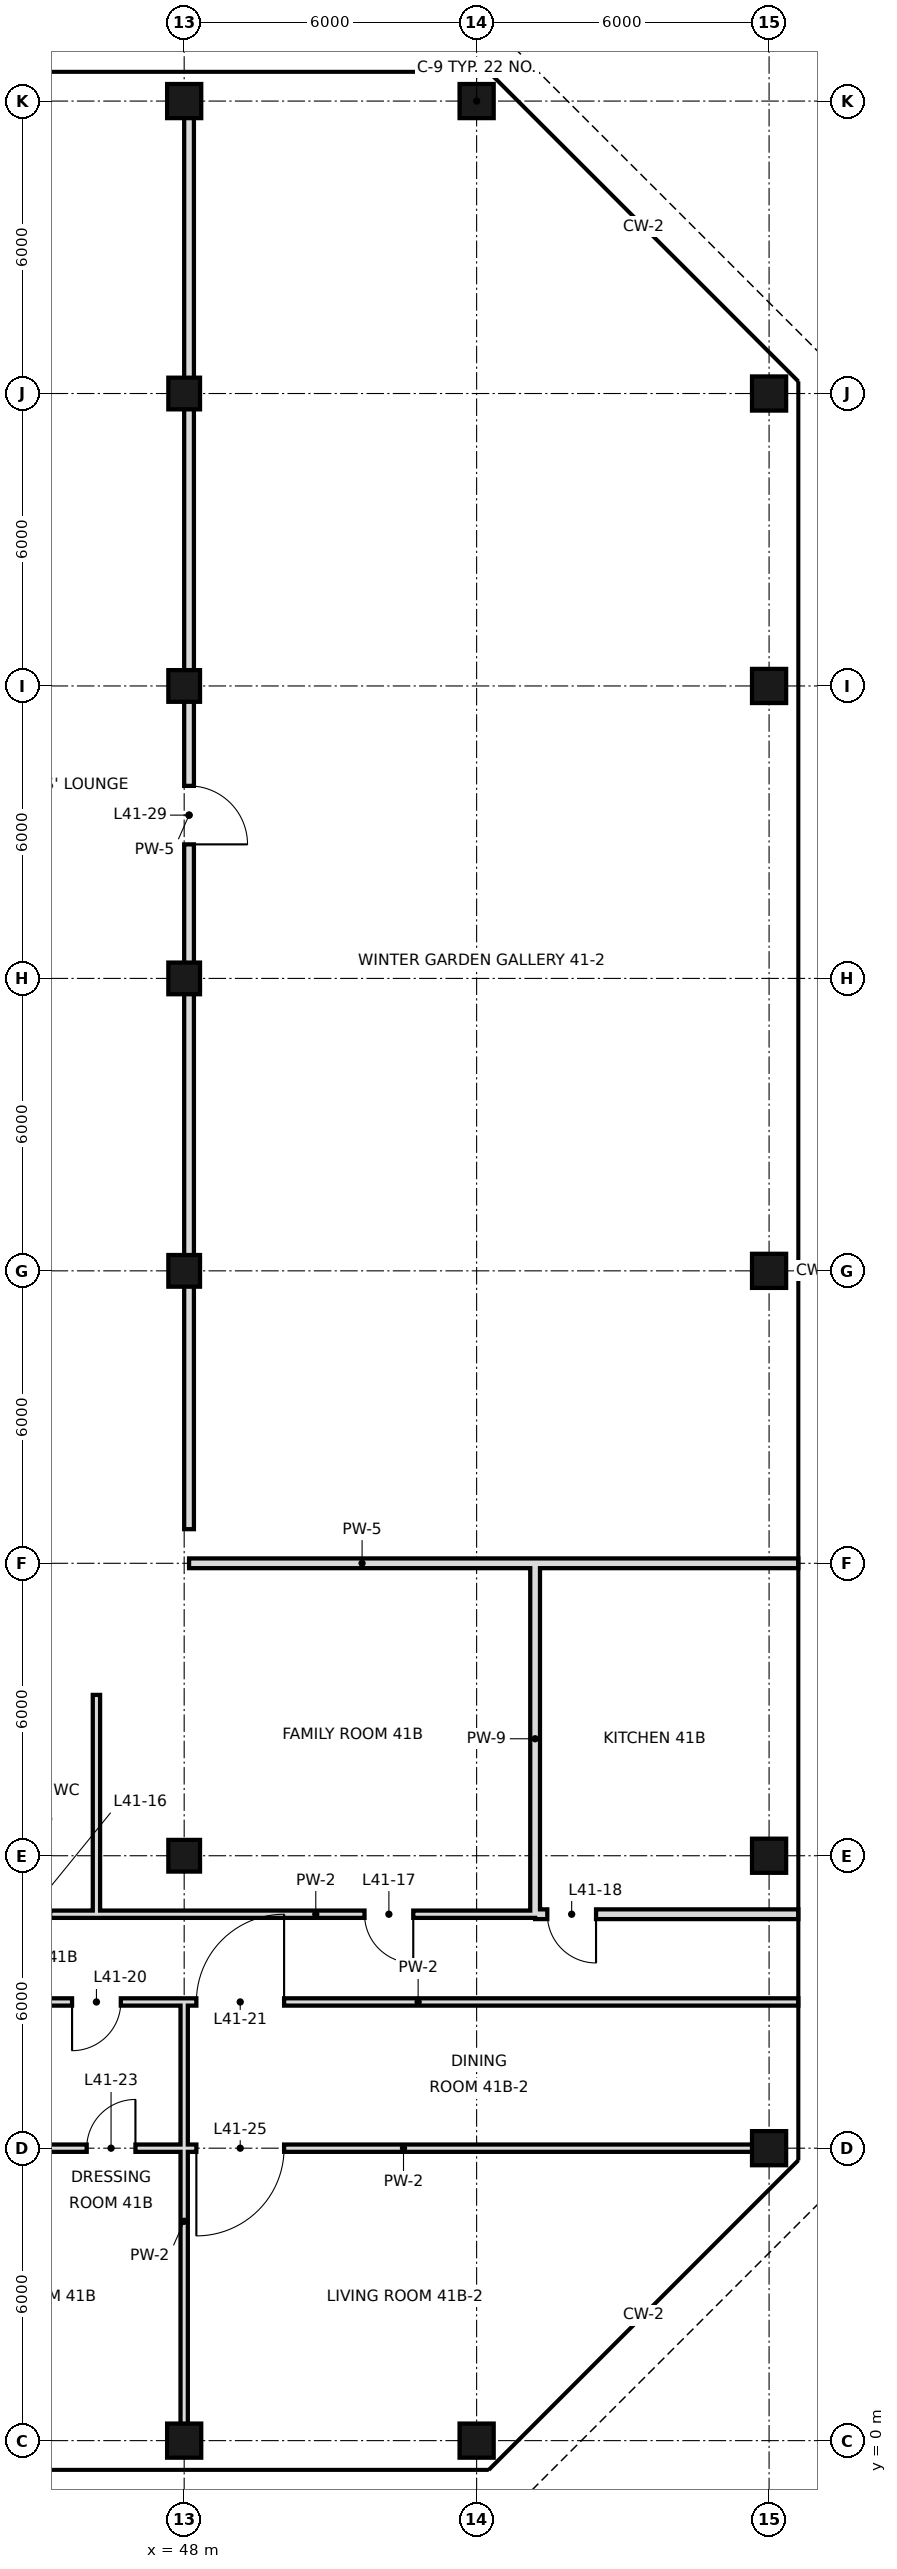
"""IFC4 building model, lengths in metres.
Left out: names, types, materials, properties, quantities, classifications, styles, units other than length and angle.
Written with IfcOpenShell. Run it as: python <this file> out.ifc"""

import sys

from ifc_helpers import new_model, si_unit, direction, frame, frame_2d, origin, origin_2d, place, context, subcontext, project, spatial, rectangle, hollow_rectangle, extrude, element, fill, save


model = new_model("IFC4")
c1 = context("Model", 3, precision=1e-05, world=origin(), true_north=direction((0.0, 1.0)))
c2 = subcontext(c1, "Body", "Model", "MODEL_VIEW")
j1 = project(units=[si_unit("LENGTHUNIT", "METRE"), si_unit("PLANEANGLEUNIT", "RADIAN")], contexts=[c1])
p1 = place(None, origin())
s1 = spatial("IfcSite", under=j1, at=p1, CompositionType="ELEMENT")
p2 = place(p1, origin())
s2 = spatial("IfcBuilding", under=s1, at=p2, CompositionType="ELEMENT")
p3 = place(p2, frame((0.0, 0.0, 178.0)))
s3 = spatial("IfcBuildingStorey", under=s2, at=p3, CompositionType="ELEMENT", Elevation=178.0)
p4 = place(p3, frame((48.0, 0.0, 0.0), z_axis=(0.0, 0.0, 1.0), x_axis=(1.0, 0.0, 0.0)))
e1 = element("IfcColumn", 1, at=p4, inside=s3, PredefinedType="COLUMN", context=c2, shape_type="SweptSolid", body=[
    extrude(hollow_rectangle(XDim=0.7, YDim=0.7, WallThickness=0.036, at=origin_2d()), origin(), (0.0, 0.0, 1.0), 3.6),
])
for number, where, z_axis, x_axis in (
    (2, (48.0, 12.0, 0.0), (0.0, 0.0, 1.0), (1.0, 0.0, 0.0)),
    (3, (48.0, 24.0, 0.0), (0.0, 0.0, 1.0), (1.0, 0.0, 0.0)),
    (4, (48.0, 30.0, 0.0), (0.0, 0.0, 1.0), (1.0, 0.0, 0.0)),
    (5, (48.0, 36.0, 0.0), (0.0, 0.0, 1.0), (1.0, 0.0, 0.0)),
    (6, (48.0, 42.0, 0.0), (0.0, 0.0, 1.0), (1.0, 0.0, 0.0)),
):
    element("IfcColumn", number, at=place(p3, frame(where, z_axis=z_axis, x_axis=x_axis)), inside=s3, PredefinedType="COLUMN", context=c2, shape_type="SweptSolid", body=[
        extrude(hollow_rectangle(XDim=0.65, YDim=0.65, WallThickness=0.032, at=origin_2d()), origin(), (0.0, 0.0, 1.0), 3.6),
    ])
for number, where, z_axis, x_axis in (
    (7, (48.0, 48.0, 0.0), (0.0, 0.0, 1.0), (1.0, 0.0, 0.0)),
    (8, (54.0, 0.0, 0.0), (0.0, 0.0, 1.0), (1.0, 0.0, 0.0)),
    (9, (54.0, 48.0, 0.0), (0.0, 0.0, 1.0), (1.0, 0.0, 0.0)),
    (10, (60.0, 6.0, 0.0), (0.0, 0.0, 1.0), (1.0, 0.0, 0.0)),
    (11, (60.0, 12.0, 0.0), (0.0, 0.0, 1.0), (1.0, 0.0, 0.0)),
    (12, (60.0, 24.0, 0.0), (0.0, 0.0, 1.0), (1.0, 0.0, 0.0)),
    (13, (60.0, 36.0, 0.0), (0.0, 0.0, 1.0), (1.0, 0.0, 0.0)),
    (14, (60.0, 42.0, 0.0), (0.0, 0.0, 1.0), (1.0, 0.0, 0.0)),
):
    element("IfcColumn", number, at=place(p3, frame(where, z_axis=z_axis, x_axis=x_axis)), inside=s3, PredefinedType="COLUMN", context=c2, shape_type="SweptSolid", body=[
        extrude(hollow_rectangle(XDim=0.7, YDim=0.7, WallThickness=0.036, at=origin_2d()), origin(), (0.0, 0.0, 1.0), 3.6),
    ])
p5 = place(p3, frame((46.2, 10.8, 0.0), z_axis=(0.0, 0.0, 1.0), x_axis=(0.0, 1.0, 0.0)))
e15 = element("IfcWall", 15, at=p5, inside=s3, PredefinedType="PARTITIONING", context=c2, shape_type="SweptSolid", body=[
    extrude(rectangle(XDim=4.5, YDim=0.15, at=frame_2d((2.25, 0.0))), origin(), (0.0, 0.0, 1.0), 3.42),
])
p6 = place(p3, frame((48.0, 0.0, 0.0), z_axis=(0.0, 0.0, 1.0), x_axis=(0.0, 1.0, 0.0)))
e16 = element("IfcWall", 16, at=p6, inside=s3, PredefinedType="PARTITIONING", context=c2, shape_type="SweptSolid", body=[
    extrude(rectangle(XDim=9.0, YDim=0.15, at=frame_2d((4.5, 0.0))), origin(), (0.0, 0.0, 1.0), 2.72),
])
p7 = place(p3, frame((48.1, 18.7, 0.0), z_axis=(0.0, 0.0, 1.0), x_axis=(0.0, 1.0, 0.0)))
e17 = element("IfcWall", 17, at=p7, inside=s3, PredefinedType="SOLIDWALL", context=c2, shape_type="SweptSolid", body=[
    extrude(rectangle(XDim=29.3, YDim=0.2, at=frame_2d((14.65, 0.0))), origin(), (0.0, 0.0, 1.0), 2.72),
])
p8 = place(p7, frame((14.05, 0.0, 0.0)))
e18 = element("IfcOpeningElement", 18, at=p8, cuts=e17, PredefinedType="OPENING", context=c2, shape_type="SweptSolid", body=[
    extrude(rectangle(XDim=1.2, YDim=2.4, at=frame_2d((0.6, 1.2))), frame((0.0, 0.11, 0.0), z_axis=(0.0, -1.0, 0.0), x_axis=(1.0, 0.0, 0.0)), (0.0, 0.0, 1.0), 0.22),
])
p9 = place(p3, frame((55.2, 10.8, 0.0), z_axis=(0.0, 0.0, 1.0), x_axis=(0.0, 1.0, 0.0)))
e19 = element("IfcWall", 19, at=p9, inside=s3, PredefinedType="SOLIDWALL", context=c2, shape_type="SweptSolid", body=[
    extrude(rectangle(XDim=7.2, YDim=0.2, at=frame_2d((3.6, 0.0))), origin(), (0.0, 0.0, 1.0), 2.72),
])
p10 = place(p3, frame((55.2, 10.8, 0.0), z_axis=(0.0, 0.0, 1.0), x_axis=(1.0, 0.0, 0.0)))
e20 = element("IfcWall", 20, at=p10, inside=s3, PredefinedType="SOLIDWALL", context=c2, shape_type="SweptSolid", body=[
    extrude(rectangle(XDim=5.4, YDim=0.2, at=frame_2d((2.7, 0.0))), origin(), (0.0, 0.0, 1.0), 2.97),
])
p11 = place(p10, frame((0.25, 0.0, 0.0)))
e21 = element("IfcOpeningElement", 21, at=p11, cuts=e20, PredefinedType="OPENING", context=c2, shape_type="SweptSolid", body=[
    extrude(rectangle(XDim=1.0, YDim=2.4, at=frame_2d((0.5, 1.2))), frame((0.0, 0.11, 0.0), z_axis=(0.0, -1.0, 0.0), x_axis=(1.0, 0.0, 0.0)), (0.0, 0.0, 1.0), 0.22),
])
p12 = place(p3, frame((46.2, 10.8, 0.0), z_axis=(0.0, 0.0, 1.0), x_axis=(1.0, 0.0, 0.0)))
e22 = element("IfcWall", 22, at=p12, inside=s3, PredefinedType="PARTITIONING", context=c2, shape_type="SweptSolid", body=[
    extrude(rectangle(XDim=9.0, YDim=0.15, at=frame_2d((4.5, 0.0))), origin(), (0.0, 0.0, 1.0), 3.42),
])
p13 = place(p12, frame((5.5, 0.0, 0.0)))
e23 = element("IfcOpeningElement", 23, at=p13, cuts=e22, PredefinedType="OPENING", context=c2, shape_type="SweptSolid", body=[
    extrude(rectangle(XDim=1.0, YDim=2.4, at=frame_2d((0.5, 1.2))), frame((0.0, 0.085, 0.0), z_axis=(0.0, -1.0, 0.0), x_axis=(1.0, 0.0, 0.0)), (0.0, 0.0, 1.0), 0.17),
])
p14 = place(p3, frame((43.8, 10.8, 0.0), z_axis=(0.0, 0.0, 1.0), x_axis=(1.0, 0.0, 0.0)))
e24 = element("IfcWall", 24, at=p14, inside=s3, PredefinedType="PARTITIONING", context=c2, shape_type="SweptSolid", body=[
    extrude(rectangle(XDim=2.4, YDim=0.15, at=frame_2d((1.2, 0.0))), origin(), (0.0, 0.0, 1.0), 3.42),
])
p15 = place(p14, frame((0.55, 0.0, 0.0)))
e25 = element("IfcOpeningElement", 25, at=p15, cuts=e24, PredefinedType="OPENING", context=c2, shape_type="SweptSolid", body=[
    extrude(rectangle(XDim=0.9, YDim=2.4, at=frame_2d((0.45, 1.2))), frame((0.0, 0.085, 0.0), z_axis=(0.0, -1.0, 0.0), x_axis=(1.0, 0.0, 0.0)), (0.0, 0.0, 1.0), 0.17),
])
p16 = place(p3, frame((48.1, 18.0, 0.0), z_axis=(0.0, 0.0, 1.0), x_axis=(1.0, 0.0, 0.0)))
e26 = element("IfcWall", 26, at=p16, inside=s3, PredefinedType="SOLIDWALL", context=c2, shape_type="SweptSolid", body=[
    extrude(rectangle(XDim=7.1, YDim=0.2, at=frame_2d((3.55, 0.0))), origin(), (0.0, 0.0, 1.0), 2.72),
])
p17 = place(p3, frame((55.2, 18.0, 0.0), z_axis=(0.0, 0.0, 1.0), x_axis=(1.0, 0.0, 0.0)))
e27 = element("IfcWall", 27, at=p17, inside=s3, PredefinedType="SOLIDWALL", context=c2, shape_type="SweptSolid", body=[
    extrude(rectangle(XDim=5.4, YDim=0.2, at=frame_2d((2.7, 0.0))), origin(), (0.0, 0.0, 1.0), 2.72),
])
p18 = place(p3, frame((45.0, 6.0, 0.0), z_axis=(0.0, 0.0, 1.0), x_axis=(1.0, 0.0, 0.0)))
e28 = element("IfcWall", 28, at=p18, inside=s3, PredefinedType="PARTITIONING", context=c2, shape_type="SweptSolid", body=[
    extrude(rectangle(XDim=15.0, YDim=0.15, at=frame_2d((7.5, 0.0))), origin(), (0.0, 0.0, 1.0), 2.72),
])
p19 = place(p18, frame((1.0, 0.0, 0.0)))
e29 = element("IfcOpeningElement", 29, at=p19, cuts=e28, PredefinedType="OPENING", context=c2, shape_type="SweptSolid", body=[
    extrude(rectangle(XDim=1.0, YDim=2.4, at=frame_2d((0.5, 1.2))), frame((0.0, 0.085, 0.0), z_axis=(0.0, -1.0, 0.0), x_axis=(1.0, 0.0, 0.0)), (0.0, 0.0, 1.0), 0.17),
])
p20 = place(p18, frame((3.25, 0.0, 0.0)))
e30 = element("IfcOpeningElement", 30, at=p20, cuts=e28, PredefinedType="OPENING", context=c2, shape_type="SweptSolid", body=[
    extrude(rectangle(XDim=1.8, YDim=2.4, at=frame_2d((0.9, 1.2))), frame((0.0, 0.085, 0.0), z_axis=(0.0, -1.0, 0.0), x_axis=(1.0, 0.0, 0.0)), (0.0, 0.0, 1.0), 0.17),
])
p21 = place(p3, frame((45.0, 9.0, 0.0), z_axis=(0.0, 0.0, 1.0), x_axis=(1.0, 0.0, 0.0)))
e31 = element("IfcWall", 31, at=p21, inside=s3, PredefinedType="PARTITIONING", context=c2, shape_type="SweptSolid", body=[
    extrude(rectangle(XDim=15.6, YDim=0.15, at=frame_2d((7.8, 0.0))), origin(), (0.0, 0.0, 1.0), 3.42),
])
p22 = place(p21, frame((0.7, 0.0, 0.0)))
e32 = element("IfcOpeningElement", 32, at=p22, cuts=e31, PredefinedType="OPENING", context=c2, shape_type="SweptSolid", body=[
    extrude(rectangle(XDim=1.0, YDim=2.4, at=frame_2d((0.5, 1.2))), frame((0.0, 0.085, 0.0), z_axis=(0.0, -1.0, 0.0), x_axis=(1.0, 0.0, 0.0)), (0.0, 0.0, 1.0), 0.17),
])
p23 = place(p21, frame((3.25, 0.0, 0.0)))
e33 = element("IfcOpeningElement", 33, at=p23, cuts=e31, PredefinedType="OPENING", context=c2, shape_type="SweptSolid", body=[
    extrude(rectangle(XDim=1.8, YDim=2.4, at=frame_2d((0.9, 1.2))), frame((0.0, 0.085, 0.0), z_axis=(0.0, -1.0, 0.0), x_axis=(1.0, 0.0, 0.0)), (0.0, 0.0, 1.0), 0.17),
])
p24 = place(p13, origin())
e34 = element("IfcDoor", 34, at=p24, inside=s3, OperationType="SINGLE_SWING_RIGHT", PredefinedType="DOOR", context=c2, shape_type="SweptSolid", body=[
    extrude(rectangle(XDim=1.0, YDim=2.4, at=frame_2d((0.5, 1.2))), frame((0.0, 0.025, 0.0), z_axis=(0.0, -1.0, 0.0), x_axis=(1.0, 0.0, 0.0)), (0.0, 0.0, 1.0), 0.05),
])
fill(e23, e34)
p25 = place(p11, origin())
e35 = element("IfcDoor", 35, at=p25, inside=s3, OperationType="SINGLE_SWING_RIGHT", PredefinedType="DOOR", context=c2, shape_type="SweptSolid", body=[
    extrude(rectangle(XDim=1.0, YDim=2.4, at=frame_2d((0.5, 1.2))), frame((0.0, 0.025, 0.0), z_axis=(0.0, -1.0, 0.0), x_axis=(1.0, 0.0, 0.0)), (0.0, 0.0, 1.0), 0.05),
])
fill(e21, e35)
p26 = place(p22, frame((1.0, 0.0, 0.0), z_axis=(0.0, 0.0, 1.0), x_axis=(-1.0, 0.0, 0.0)))
e36 = element("IfcDoor", 36, at=p26, inside=s3, OperationType="SINGLE_SWING_RIGHT", PredefinedType="DOOR", context=c2, shape_type="SweptSolid", body=[
    extrude(rectangle(XDim=1.0, YDim=2.4, at=frame_2d((0.5, 1.2))), frame((0.0, 0.025, 0.0), z_axis=(0.0, -1.0, 0.0), x_axis=(1.0, 0.0, 0.0)), (0.0, 0.0, 1.0), 0.05),
])
fill(e32, e36)
p27 = place(p23, frame((1.8, 0.0, 0.0), z_axis=(0.0, 0.0, 1.0), x_axis=(-1.0, 0.0, 0.0)))
e37 = element("IfcDoor", 37, at=p27, inside=s3, OperationType="SINGLE_SWING_LEFT", PredefinedType="DOOR", context=c2, shape_type="SweptSolid", body=[
    extrude(rectangle(XDim=1.8, YDim=2.4, at=frame_2d((0.9, 1.2))), frame((0.0, 0.025, 0.0), z_axis=(0.0, -1.0, 0.0), x_axis=(1.0, 0.0, 0.0)), (0.0, 0.0, 1.0), 0.05),
])
fill(e33, e37)
p28 = place(p19, frame((1.0, 0.0, 0.0), z_axis=(0.0, 0.0, 1.0), x_axis=(-1.0, 0.0, 0.0)))
e38 = element("IfcDoor", 38, at=p28, inside=s3, OperationType="SINGLE_SWING_LEFT", PredefinedType="DOOR", context=c2, shape_type="SweptSolid", body=[
    extrude(rectangle(XDim=1.0, YDim=2.4, at=frame_2d((0.5, 1.2))), frame((0.0, 0.025, 0.0), z_axis=(0.0, -1.0, 0.0), x_axis=(1.0, 0.0, 0.0)), (0.0, 0.0, 1.0), 0.05),
])
fill(e29, e38)
p29 = place(p20, frame((1.8, 0.0, 0.0), z_axis=(0.0, 0.0, 1.0), x_axis=(-1.0, 0.0, 0.0)))
e39 = element("IfcDoor", 39, at=p29, inside=s3, OperationType="SINGLE_SWING_RIGHT", PredefinedType="DOOR", context=c2, shape_type="SweptSolid", body=[
    extrude(rectangle(XDim=1.8, YDim=2.4, at=frame_2d((0.9, 1.2))), frame((0.0, 0.025, 0.0), z_axis=(0.0, -1.0, 0.0), x_axis=(1.0, 0.0, 0.0)), (0.0, 0.0, 1.0), 0.05),
])
fill(e30, e39)
p30 = place(p8, frame((1.2, 0.0, 0.0), z_axis=(0.0, 0.0, 1.0), x_axis=(-1.0, 0.0, 0.0)))
e40 = element("IfcDoor", 40, at=p30, inside=s3, OperationType="SINGLE_SWING_RIGHT", PredefinedType="DOOR", context=c2, shape_type="SweptSolid", body=[
    extrude(rectangle(XDim=1.2, YDim=2.4, at=frame_2d((0.6, 1.2))), frame((0.0, 0.025, 0.0), z_axis=(0.0, -1.0, 0.0), x_axis=(1.0, 0.0, 0.0)), (0.0, 0.0, 1.0), 0.05),
])
fill(e18, e40)
save(model, sys.argv[1])
